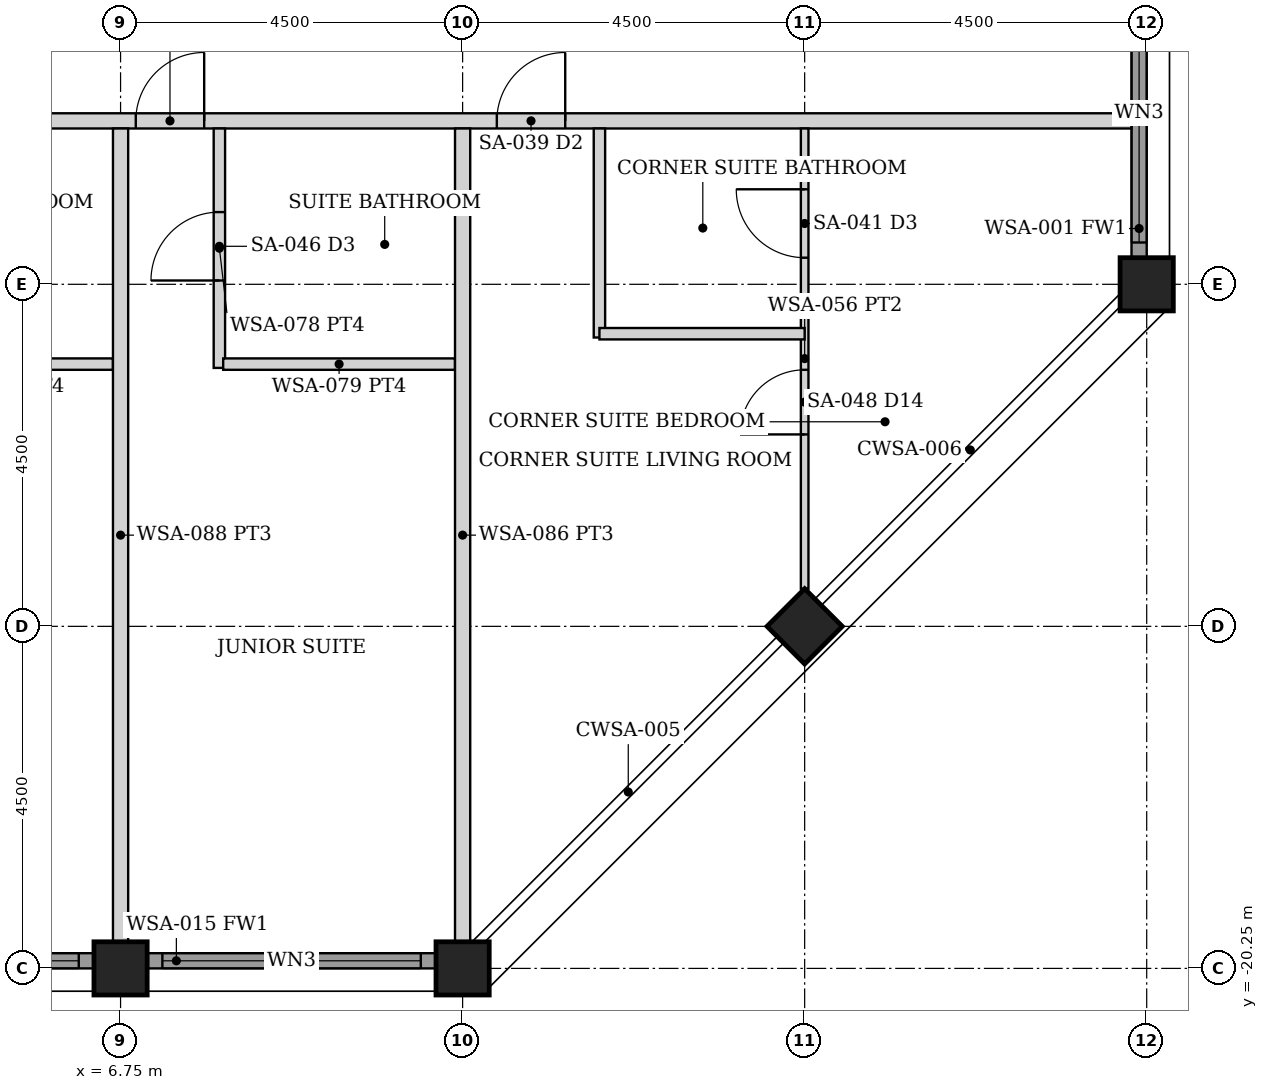
"""IFC4 building model, lengths in metres.
Left out: names, types, materials, properties, quantities, classifications, styles, units other than length and angle.
Written with IfcOpenShell. Run it as: python <this file> out.ifc"""

import sys

from ifc_helpers import new_model, si_unit, direction, frame, frame_2d, origin, origin_2d, place, context, subcontext, project, spatial, rectangle, hollow_rectangle, extrude, element, fill, save


model = new_model("IFC4")
c1 = context("Model", 3, precision=1e-05, world=origin(), true_north=direction((0.0, 1.0)))
c2 = subcontext(c1, "Body", "Model", "MODEL_VIEW")
j1 = project(units=[si_unit("LENGTHUNIT", "METRE"), si_unit("PLANEANGLEUNIT", "RADIAN")], contexts=[c1])
p1 = place(None, origin())
s1 = spatial("IfcSite", under=j1, at=p1, CompositionType="ELEMENT")
p2 = place(p1, origin())
s2 = spatial("IfcBuilding", under=s1, at=p2, CompositionType="ELEMENT")
p3 = place(p2, frame((0.0, 0.0, 200.8)))
s3 = spatial("IfcBuildingStorey", under=s2, at=p3, CompositionType="ELEMENT", Elevation=200.8)
for number, where, z_axis, x_axis in (
    (1, (20.25, -11.25, 0.0), (0.0, 0.0, 1.0), (1.0, 0.0, 0.0)),
    (2, (6.75, -20.25, 0.0), (0.0, 0.0, 1.0), (0.0, 1.0, 0.0)),
    (3, (11.25, -20.25, 0.0), (0.0, 0.0, 1.0), (0.0, 1.0, 0.0)),
    (4, (15.75, -15.75, 0.0), (0.0, 0.0, 1.0), (0.707, -0.707, 0.0)),
):
    element("IfcColumn", number, at=place(p3, frame(where, z_axis=z_axis, x_axis=x_axis)), inside=s3, PredefinedType="COLUMN", context=c2, shape_type="SweptSolid", body=[
        extrude(hollow_rectangle(XDim=0.7, YDim=0.7, WallThickness=0.045, at=origin_2d()), origin(), (0.0, 0.0, 1.0), 3.75),
    ])
p4 = place(p3, frame((2.605, -20.15, 0.0), z_axis=(0.0, 0.0, 1.0), x_axis=(1.0, 0.0, 0.0)))
e5 = element("IfcWall", 5, at=p4, inside=s3, PredefinedType="SOLIDWALL", context=c2, shape_type="SweptSolid", body=[
    extrude(rectangle(XDim=3.79, YDim=0.2, at=frame_2d((1.895, 0.0))), origin(), (0.0, 0.0, 1.0), 2.629),
])
p5 = place(p4, frame((0.195, 0.0, 0.3)))
e6 = element("IfcOpeningElement", 6, at=p5, cuts=e5, PredefinedType="OPENING", context=c2, shape_type="SweptSolid", body=[
    extrude(rectangle(XDim=3.4, YDim=2.179, at=frame_2d((1.7, 1.089))), frame((0.0, 0.11, 0.0), z_axis=(0.0, -1.0, 0.0), x_axis=(1.0, 0.0, 0.0)), (0.0, 0.0, 1.0), 0.22),
])
p6 = place(p3, frame((7.105, -20.15, 0.0), z_axis=(0.0, 0.0, 1.0), x_axis=(1.0, 0.0, 0.0)))
e7 = element("IfcWall", 7, at=p6, inside=s3, PredefinedType="SOLIDWALL", context=c2, shape_type="SweptSolid", body=[
    extrude(rectangle(XDim=3.79, YDim=0.2, at=frame_2d((1.895, 0.0))), origin(), (0.0, 0.0, 1.0), 2.629),
])
p7 = place(p6, frame((0.195, 0.0, 0.3)))
e8 = element("IfcOpeningElement", 8, at=p7, cuts=e7, PredefinedType="OPENING", context=c2, shape_type="SweptSolid", body=[
    extrude(rectangle(XDim=3.4, YDim=2.179, at=frame_2d((1.7, 1.089))), frame((0.0, 0.11, 0.0), z_axis=(0.0, -1.0, 0.0), x_axis=(1.0, 0.0, 0.0)), (0.0, 0.0, 1.0), 0.22),
])
p8 = place(p3, frame((20.15, -10.895, 0.0), z_axis=(0.0, 0.0, 1.0), x_axis=(0.0, 1.0, 0.0)))
e9 = element("IfcWall", 9, at=p8, inside=s3, PredefinedType="SOLIDWALL", context=c2, shape_type="SweptSolid", body=[
    extrude(rectangle(XDim=3.79, YDim=0.2, at=frame_2d((1.895, 0.0))), origin(), (0.0, 0.0, 1.0), 2.629),
])
p9 = place(p8, frame((0.195, 0.0, 0.3)))
e10 = element("IfcOpeningElement", 10, at=p9, cuts=e9, PredefinedType="OPENING", context=c2, shape_type="SweptSolid", body=[
    extrude(rectangle(XDim=3.4, YDim=2.179, at=frame_2d((1.7, 1.089))), frame((0.0, 0.11, 0.0), z_axis=(0.0, -1.0, 0.0), x_axis=(1.0, 0.0, 0.0)), (0.0, 0.0, 1.0), 0.22),
])
p10 = place(p3, frame((-20.05, -9.1, 0.0), z_axis=(0.0, 0.0, 1.0), x_axis=(1.0, 0.0, 0.0)))
e11 = element("IfcWall", 11, at=p10, inside=s3, PredefinedType="PARTITIONING", context=c2, shape_type="SweptSolid", body=[
    extrude(rectangle(XDim=40.1, YDim=0.2, at=frame_2d((20.05, 0.0))), origin(), (0.0, 0.0, 1.0), 2.629),
])
p11 = place(p10, frame((9.0, 0.0, 0.0)))
e12 = element("IfcOpeningElement", 12, at=p11, cuts=e11, PredefinedType="OPENING", context=c2, shape_type="SweptSolid", body=[
    extrude(rectangle(XDim=0.9, YDim=2.1, at=frame_2d((0.45, 1.05))), frame((0.0, 0.11, 0.0), z_axis=(0.0, -1.0, 0.0), x_axis=(1.0, 0.0, 0.0)), (0.0, 0.0, 1.0), 0.22),
])
p12 = place(p10, frame((13.5, 0.0, 0.0)))
e13 = element("IfcOpeningElement", 13, at=p12, cuts=e11, PredefinedType="OPENING", context=c2, shape_type="SweptSolid", body=[
    extrude(rectangle(XDim=0.9, YDim=2.1, at=frame_2d((0.45, 1.05))), frame((0.0, 0.11, 0.0), z_axis=(0.0, -1.0, 0.0), x_axis=(1.0, 0.0, 0.0)), (0.0, 0.0, 1.0), 0.22),
])
p13 = place(p10, frame((18.0, 0.0, 0.0)))
e14 = element("IfcOpeningElement", 14, at=p13, cuts=e11, PredefinedType="OPENING", context=c2, shape_type="SweptSolid", body=[
    extrude(rectangle(XDim=0.9, YDim=2.1, at=frame_2d((0.45, 1.05))), frame((0.0, 0.11, 0.0), z_axis=(0.0, -1.0, 0.0), x_axis=(1.0, 0.0, 0.0)), (0.0, 0.0, 1.0), 0.22),
])
p14 = place(p10, frame((22.5, 0.0, 0.0)))
e15 = element("IfcOpeningElement", 15, at=p14, cuts=e11, PredefinedType="OPENING", context=c2, shape_type="SweptSolid", body=[
    extrude(rectangle(XDim=0.9, YDim=2.1, at=frame_2d((0.45, 1.05))), frame((0.0, 0.11, 0.0), z_axis=(0.0, -1.0, 0.0), x_axis=(1.0, 0.0, 0.0)), (0.0, 0.0, 1.0), 0.22),
])
p15 = place(p10, frame((27.0, 0.0, 0.0)))
e16 = element("IfcOpeningElement", 16, at=p15, cuts=e11, PredefinedType="OPENING", context=c2, shape_type="SweptSolid", body=[
    extrude(rectangle(XDim=0.9, YDim=2.1, at=frame_2d((0.45, 1.05))), frame((0.0, 0.11, 0.0), z_axis=(0.0, -1.0, 0.0), x_axis=(1.0, 0.0, 0.0)), (0.0, 0.0, 1.0), 0.22),
])
p16 = place(p10, frame((31.75, 0.0, 0.0)))
e17 = element("IfcOpeningElement", 17, at=p16, cuts=e11, PredefinedType="OPENING", context=c2, shape_type="SweptSolid", body=[
    extrude(rectangle(XDim=0.9, YDim=2.1, at=frame_2d((0.45, 1.05))), frame((0.0, 0.11, 0.0), z_axis=(0.0, -1.0, 0.0), x_axis=(1.0, 0.0, 0.0)), (0.0, 0.0, 1.0), 0.22),
])
p17 = place(p10, frame((7.45, 0.0, 0.0)))
e18 = element("IfcOpeningElement", 18, at=p17, cuts=e11, PredefinedType="OPENING", context=c2, shape_type="SweptSolid", body=[
    extrude(rectangle(XDim=0.9, YDim=2.1, at=frame_2d((0.45, 1.05))), frame((0.0, 0.11, 0.0), z_axis=(0.0, -1.0, 0.0), x_axis=(1.0, 0.0, 0.0)), (0.0, 0.0, 1.0), 0.22),
])
p18 = place(p3, frame((3.6, -12.3, 0.0), z_axis=(0.0, 0.0, 1.0), x_axis=(1.0, 0.0, 0.0)))
e19 = element("IfcWall", 19, at=p18, inside=s3, PredefinedType="PARTITIONING", context=c2, shape_type="SweptSolid", body=[
    extrude(rectangle(XDim=3.05, YDim=0.15, at=frame_2d((1.525, 0.0))), origin(), (0.0, 0.0, 1.0), 2.629),
])
p19 = place(p3, frame((8.05, -12.35, 0.0), z_axis=(0.0, 0.0, 1.0), x_axis=(0.0, 1.0, 0.0)))
e20 = element("IfcWall", 20, at=p19, inside=s3, PredefinedType="PARTITIONING", context=c2, shape_type="SweptSolid", body=[
    extrude(rectangle(XDim=3.15, YDim=0.15, at=frame_2d((1.575, 0.0))), origin(), (0.0, 0.0, 1.0), 2.629),
])
p20 = place(p19, frame((1.15, 0.0, 0.0)))
e21 = element("IfcOpeningElement", 21, at=p20, cuts=e20, PredefinedType="OPENING", context=c2, shape_type="SweptSolid", body=[
    extrude(rectangle(XDim=0.9, YDim=2.1, at=frame_2d((0.45, 1.05))), frame((0.0, 0.085, 0.0), z_axis=(0.0, -1.0, 0.0), x_axis=(1.0, 0.0, 0.0)), (0.0, 0.0, 1.0), 0.17),
])
p21 = place(p3, frame((8.1, -12.3, 0.0), z_axis=(0.0, 0.0, 1.0), x_axis=(1.0, 0.0, 0.0)))
e22 = element("IfcWall", 22, at=p21, inside=s3, PredefinedType="PARTITIONING", context=c2, shape_type="SweptSolid", body=[
    extrude(rectangle(XDim=3.05, YDim=0.15, at=frame_2d((1.525, 0.0))), origin(), (0.0, 0.0, 1.0), 2.629),
])
for number, where, z_axis, x_axis in (
    (23, (6.75, -19.9, 0.0), (0.0, 0.0, 1.0), (0.0, 1.0, 0.0)),
    (24, (11.25, -19.9, 0.0), (0.0, 0.0, 1.0), (0.0, 1.0, 0.0)),
):
    element("IfcWall", number, at=place(p3, frame(where, z_axis=z_axis, x_axis=x_axis)), inside=s3, PredefinedType="PARTITIONING", context=c2, shape_type="SweptSolid", body=[
        extrude(rectangle(XDim=10.7, YDim=0.2, at=frame_2d((5.35, 0.0))), origin(), (0.0, 0.0, 1.0), 2.629),
    ])
p22 = place(p3, frame((15.75, -15.255, 0.0), z_axis=(0.0, 0.0, 1.0), x_axis=(0.0, 1.0, 0.0)))
e25 = element("IfcWall", 25, at=p22, inside=s3, PredefinedType="PARTITIONING", context=c2, shape_type="SweptSolid", body=[
    extrude(rectangle(XDim=6.055, YDim=0.1, at=frame_2d((3.027, 0.0))), origin(), (0.0, 0.0, 1.0), 2.629),
])
p23 = place(p22, frame((2.03, 0.0, 0.0)))
e26 = element("IfcOpeningElement", 26, at=p23, cuts=e25, PredefinedType="OPENING", context=c2, shape_type="SweptSolid", body=[
    extrude(rectangle(XDim=0.85, YDim=2.1, at=frame_2d((0.425, 1.05))), frame((0.0, 0.06, 0.0), z_axis=(0.0, -1.0, 0.0), x_axis=(1.0, 0.0, 0.0)), (0.0, 0.0, 1.0), 0.12),
])
p24 = place(p22, frame((4.355, 0.0, 0.0)))
e27 = element("IfcOpeningElement", 27, at=p24, cuts=e25, PredefinedType="OPENING", context=c2, shape_type="SweptSolid", body=[
    extrude(rectangle(XDim=0.9, YDim=2.1, at=frame_2d((0.45, 1.05))), frame((0.0, 0.06, 0.0), z_axis=(0.0, -1.0, 0.0), x_axis=(1.0, 0.0, 0.0)), (0.0, 0.0, 1.0), 0.12),
])
p25 = place(p3, frame((13.05, -11.95, 0.0), z_axis=(0.0, 0.0, 1.0), x_axis=(0.0, 1.0, 0.0)))
e28 = element("IfcWall", 28, at=p25, inside=s3, PredefinedType="PARTITIONING", context=c2, shape_type="SweptSolid", body=[
    extrude(rectangle(XDim=2.75, YDim=0.15, at=frame_2d((1.375, 0.0))), origin(), (0.0, 0.0, 1.0), 2.629),
])
p26 = place(p3, frame((13.05, -11.9, 0.0), z_axis=(0.0, 0.0, 1.0), x_axis=(1.0, 0.0, 0.0)))
e29 = element("IfcWall", 29, at=p26, inside=s3, PredefinedType="PARTITIONING", context=c2, shape_type="SweptSolid", body=[
    extrude(rectangle(XDim=2.7, YDim=0.15, at=frame_2d((1.35, 0.0))), origin(), (0.0, 0.0, 1.0), 2.629),
])
p27 = place(p5, origin())
e30 = element("IfcWindow", 30, at=p27, inside=s3, PartitioningType="SINGLE_PANEL", PredefinedType="WINDOW", context=c2, shape_type="SweptSolid", body=[
    extrude(rectangle(XDim=3.4, YDim=2.179, at=frame_2d((1.7, 1.089))), frame((0.0, 0.03, 0.0), z_axis=(0.0, -1.0, 0.0), x_axis=(1.0, 0.0, 0.0)), (0.0, 0.0, 1.0), 0.06),
])
fill(e6, e30)
p28 = place(p7, origin())
e31 = element("IfcWindow", 31, at=p28, inside=s3, PartitioningType="SINGLE_PANEL", PredefinedType="WINDOW", context=c2, shape_type="SweptSolid", body=[
    extrude(rectangle(XDim=3.4, YDim=2.179, at=frame_2d((1.7, 1.089))), frame((0.0, 0.03, 0.0), z_axis=(0.0, -1.0, 0.0), x_axis=(1.0, 0.0, 0.0)), (0.0, 0.0, 1.0), 0.06),
])
fill(e8, e31)
p29 = place(p9, origin())
e32 = element("IfcWindow", 32, at=p29, inside=s3, PartitioningType="SINGLE_PANEL", PredefinedType="WINDOW", context=c2, shape_type="SweptSolid", body=[
    extrude(rectangle(XDim=3.4, YDim=2.179, at=frame_2d((1.7, 1.089))), frame((0.0, 0.03, 0.0), z_axis=(0.0, -1.0, 0.0), x_axis=(1.0, 0.0, 0.0)), (0.0, 0.0, 1.0), 0.06),
])
fill(e10, e32)
p30 = place(p15, origin())
e33 = element("IfcDoor", 33, at=p30, inside=s3, OperationType="SINGLE_SWING_RIGHT", PredefinedType="DOOR", context=c2, shape_type="SweptSolid", body=[
    extrude(rectangle(XDim=0.9, YDim=2.1, at=frame_2d((0.45, 1.05))), frame((0.0, 0.025, 0.0), z_axis=(0.0, -1.0, 0.0), x_axis=(1.0, 0.0, 0.0)), (0.0, 0.0, 1.0), 0.05),
])
fill(e16, e33)
p31 = place(p20, origin())
e34 = element("IfcDoor", 34, at=p31, inside=s3, OperationType="SINGLE_SWING_LEFT", PredefinedType="DOOR", context=c2, shape_type="SweptSolid", body=[
    extrude(rectangle(XDim=0.9, YDim=2.1, at=frame_2d((0.45, 1.05))), frame((0.0, 0.025, 0.0), z_axis=(0.0, -1.0, 0.0), x_axis=(1.0, 0.0, 0.0)), (0.0, 0.0, 1.0), 0.05),
])
fill(e21, e34)
p32 = place(p16, origin())
e35 = element("IfcDoor", 35, at=p32, inside=s3, OperationType="SINGLE_SWING_RIGHT", PredefinedType="DOOR", context=c2, shape_type="SweptSolid", body=[
    extrude(rectangle(XDim=0.9, YDim=2.1, at=frame_2d((0.45, 1.05))), frame((0.0, 0.025, 0.0), z_axis=(0.0, -1.0, 0.0), x_axis=(1.0, 0.0, 0.0)), (0.0, 0.0, 1.0), 0.05),
])
fill(e17, e35)
p33 = place(p23, origin())
e36 = element("IfcDoor", 36, at=p33, inside=s3, OperationType="SINGLE_SWING_LEFT", PredefinedType="DOOR", context=c2, shape_type="SweptSolid", body=[
    extrude(rectangle(XDim=0.85, YDim=2.1, at=frame_2d((0.425, 1.05))), frame((0.0, 0.025, 0.0), z_axis=(0.0, -1.0, 0.0), x_axis=(1.0, 0.0, 0.0)), (0.0, 0.0, 1.0), 0.05),
])
fill(e26, e36)
p34 = place(p24, origin())
e37 = element("IfcDoor", 37, at=p34, inside=s3, OperationType="SINGLE_SWING_RIGHT", PredefinedType="DOOR", context=c2, shape_type="SweptSolid", body=[
    extrude(rectangle(XDim=0.9, YDim=2.1, at=frame_2d((0.45, 1.05))), frame((0.0, 0.025, 0.0), z_axis=(0.0, -1.0, 0.0), x_axis=(1.0, 0.0, 0.0)), (0.0, 0.0, 1.0), 0.05),
])
fill(e27, e37)
save(model, sys.argv[1])
